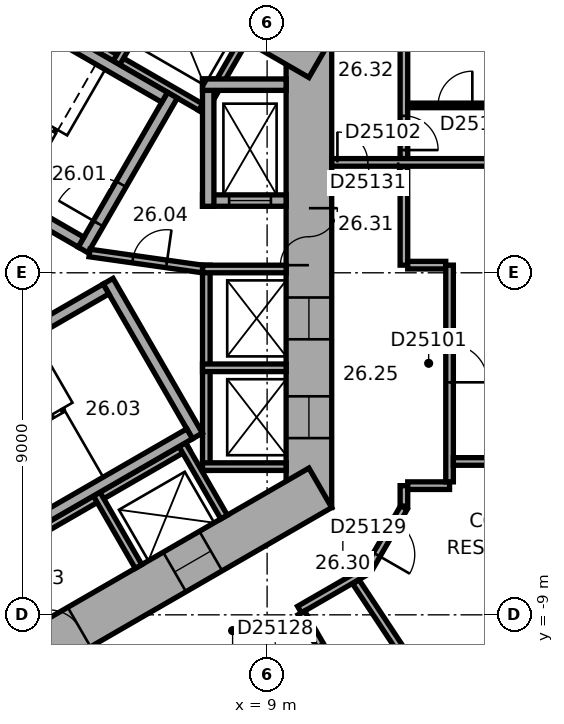
"""IFC4 building model, lengths in metres.
Left out: names, types, materials, properties, quantities, classifications, styles, units other than length and angle.
Written with IfcOpenShell. Run it as: python <this file> out.ifc"""

import sys

from ifc_helpers import new_model, si_unit, direction, frame, frame_2d, origin, place, context, subcontext, project, spatial, rectangle, extrude, element, fill, save


model = new_model("IFC4")
c1 = context("Model", 3, precision=1e-05, world=origin(), true_north=direction((0.0, 1.0)))
c2 = subcontext(c1, "Body", "Model", "MODEL_VIEW")
j1 = project(units=[si_unit("LENGTHUNIT", "METRE"), si_unit("PLANEANGLEUNIT", "RADIAN")], contexts=[c1])
p1 = place(None, origin())
s1 = spatial("IfcSite", under=j1, at=p1, CompositionType="ELEMENT")
p2 = place(p1, origin())
s2 = spatial("IfcBuilding", under=s1, at=p2, CompositionType="ELEMENT")
p3 = place(p2, frame((0.0, 0.0, 110.0)))
s3 = spatial("IfcBuildingStorey", under=s2, at=p3, CompositionType="ELEMENT", Elevation=110.0)
p4 = place(p3, frame((10.1, -6.177, 0.0), z_axis=(0.0, 0.0, 1.0), x_axis=(0.0, 1.0, 0.0)))
e1 = element("IfcWall", 1, at=p4, inside=s3, PredefinedType="SHEAR", context=c2, shape_type="SweptSolid", body=[
    extrude(rectangle(XDim=12.355, YDim=1.2, at=frame_2d((6.177, 0.0))), origin(), (0.0, 0.0, 1.0), 3.3),
])
p5 = place(p4, frame((6.378, 0.0, 0.0)))
e2 = element("IfcOpeningElement", 2, at=p5, cuts=e1, PredefinedType="OPENING", context=c2, shape_type="SweptSolid", body=[
    extrude(rectangle(XDim=1.5, YDim=2.1, at=frame_2d((0.75, 1.05))), frame((0.0, 0.61, 0.0), z_axis=(0.0, -1.0, 0.0), x_axis=(1.0, 0.0, 0.0)), (0.0, 0.0, 1.0), 1.22),
])
p6 = place(p4, frame((1.828, 0.0, 0.0)))
e3 = element("IfcOpeningElement", 3, at=p6, cuts=e1, PredefinedType="OPENING", context=c2, shape_type="SweptSolid", body=[
    extrude(rectangle(XDim=1.1, YDim=2.1, at=frame_2d((0.55, 1.05))), frame((0.0, 0.61, 0.0), z_axis=(0.0, -1.0, 0.0), x_axis=(1.0, 0.0, 0.0)), (0.0, 0.0, 1.0), 1.22),
])
p7 = place(p4, frame((4.427, 0.0, 0.0)))
e4 = element("IfcOpeningElement", 4, at=p7, cuts=e1, PredefinedType="OPENING", context=c2, shape_type="SweptSolid", body=[
    extrude(rectangle(XDim=1.1, YDim=2.1, at=frame_2d((0.55, 1.05))), frame((0.0, 0.61, 0.0), z_axis=(0.0, -1.0, 0.0), x_axis=(1.0, 0.0, 0.0)), (0.0, 0.0, 1.0), 1.22),
])
p8 = place(p3, frame((10.4, 5.658, 0.0), z_axis=(0.0, 0.0, 1.0), x_axis=(-0.866021384402, 0.500006961711, 0.0)))
e5 = element("IfcWall", 5, at=p8, inside=s3, PredefinedType="SHEAR", context=c2, shape_type="SweptSolid", body=[
    extrude(rectangle(XDim=12.355, YDim=1.2, at=frame_2d((6.178, 0.0))), origin(), (0.0, 0.0, 1.0), 3.3),
])
p9 = place(p8, frame((2.728, 0.0, 0.0)))
e6 = element("IfcOpeningElement", 6, at=p9, cuts=e5, PredefinedType="OPENING", context=c2, shape_type="SweptSolid", body=[
    extrude(rectangle(XDim=1.1, YDim=2.1, at=frame_2d((0.55, 1.05))), frame((0.0, 0.61, 0.0), z_axis=(0.0, -1.0, 0.0), x_axis=(1.0, 0.0, 0.0)), (0.0, 0.0, 1.0), 1.22),
])
p10 = place(p8, frame((5.328, 0.0, 0.0)))
e7 = element("IfcOpeningElement", 7, at=p10, cuts=e5, PredefinedType="OPENING", context=c2, shape_type="SweptSolid", body=[
    extrude(rectangle(XDim=1.1, YDim=2.1, at=frame_2d((0.55, 1.05))), frame((0.0, 0.61, 0.0), z_axis=(0.0, -1.0, 0.0), x_axis=(1.0, 0.0, 0.0)), (0.0, 0.0, 1.0), 1.22),
])
p11 = place(p8, frame((7.928, 0.0, 0.0)))
e8 = element("IfcOpeningElement", 8, at=p11, cuts=e5, PredefinedType="OPENING", context=c2, shape_type="SweptSolid", body=[
    extrude(rectangle(XDim=1.1, YDim=2.1, at=frame_2d((0.55, 1.05))), frame((0.0, 0.61, 0.0), z_axis=(0.0, -1.0, 0.0), x_axis=(1.0, 0.0, 0.0)), (0.0, 0.0, 1.0), 1.22),
])
p12 = place(p3, frame((-0.3, -11.836, 0.0), z_axis=(0.0, 0.0, 1.0), x_axis=(0.866021384402, 0.500006961711, 0.0)))
e9 = element("IfcWall", 9, at=p12, inside=s3, PredefinedType="SHEAR", context=c2, shape_type="SweptSolid", body=[
    extrude(rectangle(XDim=12.355, YDim=1.2, at=frame_2d((6.178, 0.0))), origin(), (0.0, 0.0, 1.0), 3.3),
])
p13 = place(p12, frame((4.128, 0.0, 0.0)))
e10 = element("IfcOpeningElement", 10, at=p13, cuts=e9, PredefinedType="OPENING", context=c2, shape_type="SweptSolid", body=[
    extrude(rectangle(XDim=0.9, YDim=2.1, at=frame_2d((0.45, 1.05))), frame((0.0, 0.61, 0.0), z_axis=(0.0, -1.0, 0.0), x_axis=(1.0, 0.0, 0.0)), (0.0, 0.0, 1.0), 1.22),
])
p14 = place(p12, frame((7.928, 0.0, 0.0)))
e11 = element("IfcOpeningElement", 11, at=p14, cuts=e9, PredefinedType="OPENING", context=c2, shape_type="SweptSolid", body=[
    extrude(rectangle(XDim=1.1, YDim=2.1, at=frame_2d((0.55, 1.05))), frame((0.0, 0.61, 0.0), z_axis=(0.0, -1.0, 0.0), x_axis=(1.0, 0.0, 0.0)), (0.0, 0.0, 1.0), 1.22),
])
p15 = place(p3, frame((7.4, -5.2, 0.0), z_axis=(0.0, 0.0, 1.0), x_axis=(0.0, 1.0, 0.0)))
e12 = element("IfcWall", 12, at=p15, inside=s3, PredefinedType="PARTITIONING", context=c2, shape_type="SweptSolid", body=[
    extrude(rectangle(XDim=5.4, YDim=0.2, at=frame_2d((2.7, 0.0))), origin(), (0.0, 0.0, 1.0), 3.05),
])
for number, where, z_axis, x_axis in (
    (13, (7.3, -5.1, 0.0), (0.0, 0.0, 1.0), (1.0, 0.0, 0.0)),
    (14, (7.3, -2.5, 0.0), (0.0, 0.0, 1.0), (1.0, 0.0, 0.0)),
    (15, (7.3, 0.1, 0.0), (0.0, 0.0, 1.0), (1.0, 0.0, 0.0)),
):
    element("IfcWall", number, at=place(p3, frame(where, z_axis=z_axis, x_axis=x_axis)), inside=s3, PredefinedType="PARTITIONING", context=c2, shape_type="SweptSolid", body=[
        extrude(rectangle(XDim=2.2, YDim=0.2, at=frame_2d((1.1, 0.0))), origin(), (0.0, 0.0, 1.0), 3.05),
    ])
p16 = place(p3, frame((7.424, 4.259, 0.0), z_axis=(0.0, 0.0, 1.0), x_axis=(-0.866026010844, 0.49999894854, 0.0)))
e16 = element("IfcWall", 16, at=p16, inside=s3, PredefinedType="PARTITIONING", context=c2, shape_type="SweptSolid", body=[
    extrude(rectangle(XDim=8.0, YDim=0.2, at=frame_2d((4.0, 0.0))), origin(), (0.0, 0.0, 1.0), 3.05),
])
for number, where, z_axis, x_axis in (
    (17, (7.287, 4.222, 0.0), (0.0, 0.0, 1.0), (0.5, 0.866, 0.0)),
    (18, (5.036, 5.522, 0.0), (0.0, 0.0, 1.0), (0.5, 0.866, 0.0)),
):
    element("IfcWall", number, at=place(p3, frame(where, z_axis=z_axis, x_axis=x_axis)), inside=s3, PredefinedType="PARTITIONING", context=c2, shape_type="SweptSolid", body=[
        extrude(rectangle(XDim=2.2, YDim=0.2, at=frame_2d((1.1, 0.0))), origin(), (0.0, 0.0, 1.0), 3.05),
    ])
p17 = place(p3, frame((-0.024, -8.559, 0.0), z_axis=(0.0, 0.0, 1.0), x_axis=(0.866026010844, 0.49999894854, 0.0)))
e19 = element("IfcWall", 19, at=p17, inside=s3, PredefinedType="PARTITIONING", context=c2, shape_type="SweptSolid", body=[
    extrude(rectangle(XDim=8.0, YDim=0.2, at=frame_2d((4.0, 0.0))), origin(), (0.0, 0.0, 1.0), 3.05),
])
for number, where, z_axis, x_axis in (
    (20, (4.516, -5.822, 0.0), (0.0, 0.0, 1.0), (0.5, -0.866, 0.0)),
    (21, (6.768, -4.522, 0.0), (0.0, 0.0, 1.0), (0.5, -0.866, 0.0)),
):
    element("IfcWall", number, at=place(p3, frame(where, z_axis=z_axis, x_axis=x_axis)), inside=s3, PredefinedType="PARTITIONING", context=c2, shape_type="SweptSolid", body=[
        extrude(rectangle(XDim=2.2, YDim=0.2, at=frame_2d((1.1, 0.0))), origin(), (0.0, 0.0, 1.0), 3.05),
    ])
p18 = place(p3, frame((4.158, 0.602, 0.0), z_axis=(0.0, 0.0, 1.0), x_axis=(0.499977259774, 0.866038532462, 0.0)))
e22 = element("IfcWall", 22, at=p18, inside=s3, PredefinedType="SHEAR", context=c2, shape_type="SweptSolid", body=[
    extrude(rectangle(XDim=4.7, YDim=0.3, at=frame_2d((2.35, 0.0))), origin(), (0.0, 0.0, 1.0), 3.05),
])
p19 = place(p18, frame((0.8, 0.0, 0.0)))
e23 = element("IfcOpeningElement", 23, at=p19, cuts=e22, PredefinedType="OPENING", context=c2, shape_type="SweptSolid", body=[
    extrude(rectangle(XDim=1.2, YDim=2.1, at=frame_2d((0.6, 1.05))), frame((0.0, 0.16, 0.0), z_axis=(0.0, -1.0, 0.0), x_axis=(1.0, 0.0, 0.0)), (0.0, 0.0, 1.0), 0.32),
])
for number, where, z_axis, x_axis in (
    (24, (4.103, 0.807, 0.0), (0.0, 0.0, 1.0), (-0.866, 0.5, 0.0)),
    (25, (6.303, 4.617, 0.0), (0.0, 0.0, 1.0), (-0.866, 0.5, 0.0)),
):
    element("IfcWall", number, at=place(p3, frame(where, z_axis=z_axis, x_axis=x_axis)), inside=s3, PredefinedType="SHEAR", context=c2, shape_type="SweptSolid", body=[
        extrude(rectangle(XDim=7.06, YDim=0.3, at=frame_2d((3.53, 0.0))), origin(), (0.0, 0.0, 1.0), 3.05),
    ])
p20 = place(p3, frame((4.816, -0.222, 0.0), z_axis=(0.0, 0.0, 1.0), x_axis=(0.499977259774, -0.866038532462, 0.0)))
e26 = element("IfcWall", 26, at=p20, inside=s3, PredefinedType="SHEAR", context=c2, shape_type="SweptSolid", body=[
    extrude(rectangle(XDim=4.7, YDim=0.3, at=frame_2d((2.35, 0.0))), origin(), (0.0, 0.0, 1.0), 3.05),
])
for number, where, z_axis, x_axis in (
    (27, (-1.353, -3.957, 0.0), (0.0, 0.0, 1.0), (0.866, 0.5, 0.0)),
    (28, (0.847, -7.767, 0.0), (0.0, 0.0, 1.0), (0.866, 0.5, 0.0)),
):
    element("IfcWall", number, at=place(p3, frame(where, z_axis=z_axis, x_axis=x_axis)), inside=s3, PredefinedType="SHEAR", context=c2, shape_type="SweptSolid", body=[
        extrude(rectangle(XDim=7.06, YDim=0.3, at=frame_2d((3.53, 0.0))), origin(), (0.0, 0.0, 1.0), 3.05),
    ])
p21 = place(p3, frame((7.3, 1.9, 0.0), z_axis=(0.0, 0.0, 1.0), x_axis=(1.0, 0.0, 0.0)))
e29 = element("IfcWall", 29, at=p21, inside=s3, PredefinedType="SHEAR", context=c2, shape_type="SweptSolid", body=[
    extrude(rectangle(XDim=2.2, YDim=0.3, at=frame_2d((1.1, 0.0))), origin(), (0.0, 0.0, 1.0), 3.05),
])
p22 = place(p21, frame((0.7, 0.0, 0.0)))
e30 = element("IfcOpeningElement", 30, at=p22, cuts=e29, PredefinedType="OPENING", context=c2, shape_type="SweptSolid", body=[
    extrude(rectangle(XDim=1.1, YDim=2.1, at=frame_2d((0.55, 1.05))), frame((0.0, 0.16, 0.0), z_axis=(0.0, -1.0, 0.0), x_axis=(1.0, 0.0, 0.0)), (0.0, 0.0, 1.0), 0.32),
])
p23 = place(p3, frame((7.45, 1.75, 0.0), z_axis=(0.0, 0.0, 1.0), x_axis=(0.0, 1.0, 0.0)))
e31 = element("IfcWall", 31, at=p23, inside=s3, PredefinedType="SHEAR", context=c2, shape_type="SweptSolid", body=[
    extrude(rectangle(XDim=3.35, YDim=0.3, at=frame_2d((1.675, 0.0))), origin(), (0.0, 0.0, 1.0), 3.05),
])
p24 = place(p3, frame((7.3, 4.95, 0.0), z_axis=(0.0, 0.0, 1.0), x_axis=(1.0, 0.0, 0.0)))
e32 = element("IfcWall", 32, at=p24, inside=s3, PredefinedType="SHEAR", context=c2, shape_type="SweptSolid", body=[
    extrude(rectangle(XDim=2.2, YDim=0.3, at=frame_2d((1.1, 0.0))), origin(), (0.0, 0.0, 1.0), 3.05),
])
p25 = place(p3, frame((4.327, 0.521, 0.0), z_axis=(0.0, 0.0, 1.0), x_axis=(0.990124376366, -0.14019172346, 0.0)))
e33 = element("IfcWall", 33, at=p25, inside=s3, PredefinedType="PARTITIONING", context=c2, shape_type="SweptSolid", body=[
    extrude(rectangle(XDim=3.002, YDim=0.2, at=frame_2d((1.501, 0.0))), origin(), (0.0, 0.0, 1.0), 3.05),
])
p26 = place(p25, frame((1.15, 0.0, 0.0)))
e34 = element("IfcOpeningElement", 34, at=p26, cuts=e33, PredefinedType="OPENING", context=c2, shape_type="SweptSolid", body=[
    extrude(rectangle(XDim=0.9, YDim=2.1, at=frame_2d((0.45, 1.05))), frame((0.0, 0.11, 0.0), z_axis=(0.0, -1.0, 0.0), x_axis=(1.0, 0.0, 0.0)), (0.0, 0.0, 1.0), 0.22),
])
p27 = place(p3, frame((9.852, -8.861, 0.0), z_axis=(0.0, 0.0, 1.0), x_axis=(0.866013291437, 0.500020978615, 0.0)))
e35 = element("IfcWall", 35, at=p27, inside=s3, PredefinedType="PARTITIONING", context=c2, shape_type="SweptSolid", body=[
    extrude(rectangle(XDim=2.077, YDim=0.2, at=frame_2d((1.038, 0.0))), origin(), (0.0, 0.0, 1.0), 3.05),
])
p28 = place(p3, frame((10.402, -9.815, 0.0), z_axis=(0.0, 0.0, 1.0), x_axis=(-0.499968756647, 0.866043441391, 0.0)))
e36 = element("IfcWall", 36, at=p28, inside=s3, PredefinedType="PARTITIONING", context=c2, shape_type="SweptSolid", body=[
    extrude(rectangle(XDim=1.001, YDim=0.2, at=frame_2d((0.5, 0.0))), origin(), (0.0, 0.0, 1.0), 3.05),
])
p29 = place(p3, frame((11.67, -7.788, 0.0), z_axis=(0.0, 0.0, 1.0), x_axis=(0.500063286585, 0.865988862174, 0.0)))
e37 = element("IfcWall", 37, at=p29, inside=s3, PredefinedType="PARTITIONING", context=c2, shape_type="SweptSolid", body=[
    extrude(rectangle(XDim=1.86, YDim=0.2, at=frame_2d((0.93, 0.0))), origin(), (0.0, 0.0, 1.0), 3.05),
])
p30 = place(p29, frame((0.43, 0.0, 0.0)))
e38 = element("IfcOpeningElement", 38, at=p30, cuts=e37, PredefinedType="OPENING", context=c2, shape_type="SweptSolid", body=[
    extrude(rectangle(XDim=1.0, YDim=2.1, at=frame_2d((0.5, 1.05))), frame((0.0, 0.11, 0.0), z_axis=(0.0, -1.0, 0.0), x_axis=(1.0, 0.0, 0.0)), (0.0, 0.0, 1.0), 0.22),
])
p31 = place(p3, frame((12.6, -6.138, 0.0), z_axis=(0.0, 0.0, 1.0), x_axis=(0.0, 1.0, 0.0)))
e39 = element("IfcWall", 39, at=p31, inside=s3, PredefinedType="PARTITIONING", context=c2, shape_type="SweptSolid", body=[
    extrude(rectangle(XDim=0.537, YDim=0.2, at=frame_2d((0.268, 0.0))), origin(), (0.0, 0.0, 1.0), 3.05),
])
p32 = place(p3, frame((12.6, 0.201, 0.0), z_axis=(0.0, 0.0, 1.0), x_axis=(0.0, 1.0, 0.0)))
e40 = element("IfcWall", 40, at=p32, inside=s3, PredefinedType="PARTITIONING", context=c2, shape_type="SweptSolid", body=[
    extrude(rectangle(XDim=2.604, YDim=0.2, at=frame_2d((1.302, 0.0))), origin(), (0.0, 0.0, 1.0), 3.05),
])
p33 = place(p3, frame((12.6, 3.004, 0.0), z_axis=(0.0, 0.0, 1.0), x_axis=(0.0, 1.0, 0.0)))
e41 = element("IfcWall", 41, at=p33, inside=s3, PredefinedType="PARTITIONING", context=c2, shape_type="SweptSolid", body=[
    extrude(rectangle(XDim=3.173, YDim=0.2, at=frame_2d((1.586, 0.0))), origin(), (0.0, 0.0, 1.0), 3.05),
])
p34 = place(p33, frame((0.225, 0.0, 0.0)))
e42 = element("IfcOpeningElement", 42, at=p34, cuts=e41, PredefinedType="OPENING", context=c2, shape_type="SweptSolid", body=[
    extrude(rectangle(XDim=0.9, YDim=2.1, at=frame_2d((0.45, 1.05))), frame((0.0, 0.11, 0.0), z_axis=(0.0, -1.0, 0.0), x_axis=(1.0, 0.0, 0.0)), (0.0, 0.0, 1.0), 0.22),
])
p35 = place(p3, frame((12.7, -5.601, 0.0), z_axis=(0.0, 0.0, 1.0), x_axis=(1.0, 0.0, 0.0)))
e43 = element("IfcWall", 43, at=p35, inside=s3, PredefinedType="PARTITIONING", context=c2, shape_type="SweptSolid", body=[
    extrude(rectangle(XDim=1.101, YDim=0.2, at=frame_2d((0.551, 0.0))), origin(), (0.0, 0.0, 1.0), 3.05),
])
p36 = place(p3, frame((13.701, 0.201, 0.0), z_axis=(0.0, 0.0, 1.0), x_axis=(-1.0, 0.0, 0.0)))
e44 = element("IfcWall", 44, at=p36, inside=s3, PredefinedType="PARTITIONING", context=c2, shape_type="SweptSolid", body=[
    extrude(rectangle(XDim=1.001, YDim=0.2, at=frame_2d((0.5, 0.0))), origin(), (0.0, 0.0, 1.0), 3.05),
])
p37 = place(p3, frame((13.801, -5.501, 0.0), z_axis=(0.0, 0.0, 1.0), x_axis=(0.0, 1.0, 0.0)))
e45 = element("IfcWall", 45, at=p37, inside=s3, PredefinedType="PARTITIONING", context=c2, shape_type="SweptSolid", body=[
    extrude(rectangle(XDim=5.702, YDim=0.2, at=frame_2d((2.851, 0.0))), origin(), (0.0, 0.0, 1.0), 3.05),
])
p38 = place(p37, frame((2.619, 0.0, 0.0)))
e46 = element("IfcOpeningElement", 46, at=p38, cuts=e45, PredefinedType="OPENING", context=c2, shape_type="SweptSolid", body=[
    extrude(rectangle(XDim=1.0, YDim=2.1, at=frame_2d((0.5, 1.05))), frame((0.0, 0.11, 0.0), z_axis=(0.0, -1.0, 0.0), x_axis=(1.0, 0.0, 0.0)), (0.0, 0.0, 1.0), 0.22),
])
p39 = place(p3, frame((13.901, -4.965, 0.0), z_axis=(0.0, 0.0, 1.0), x_axis=(1.0, 0.0, 0.0)))
e47 = element("IfcWall", 47, at=p39, inside=s3, PredefinedType="PARTITIONING", context=c2, shape_type="SweptSolid", body=[
    extrude(rectangle(XDim=8.049, YDim=0.2, at=frame_2d((4.024, 0.0))), origin(), (0.0, 0.0, 1.0), 3.05),
])
p40 = place(p3, frame((15.2, 4.405, 0.0), z_axis=(0.0, 0.0, 1.0), x_axis=(-1.0, 0.0, 0.0)))
e48 = element("IfcWall", 48, at=p40, inside=s3, PredefinedType="PARTITIONING", context=c2, shape_type="SweptSolid", body=[
    extrude(rectangle(XDim=2.5, YDim=0.12, at=frame_2d((1.25, 0.0))), origin(), (0.0, 0.0, 1.0), 3.05),
])
p41 = place(p40, frame((0.8, 0.0, 0.0)))
e49 = element("IfcOpeningElement", 49, at=p41, cuts=e48, PredefinedType="OPENING", context=c2, shape_type="SweptSolid", body=[
    extrude(rectangle(XDim=0.9, YDim=2.1, at=frame_2d((0.45, 1.05))), frame((0.0, 0.07, 0.0), z_axis=(0.0, -1.0, 0.0), x_axis=(1.0, 0.0, 0.0)), (0.0, 0.0, 1.0), 0.14),
])
p42 = place(p3, frame((16.255, -15.564, 0.0), z_axis=(0.0, 0.0, 1.0), x_axis=(-0.55192208744, 0.833895682562, 0.0)))
e50 = element("IfcWall", 50, at=p42, inside=s3, PredefinedType="PARTITIONING", context=c2, shape_type="SweptSolid", body=[
    extrude(rectangle(XDim=8.913, YDim=0.2, at=frame_2d((4.457, 0.0))), origin(), (0.0, 0.0, 1.0), 2.6),
])
p43 = place(p3, frame((21.95, 2.905, 0.0), z_axis=(0.0, 0.0, 1.0), x_axis=(-1.0, 0.0, 0.0)))
e51 = element("IfcWall", 51, at=p43, inside=s3, PredefinedType="PARTITIONING", context=c2, shape_type="SweptSolid", body=[
    extrude(rectangle(XDim=11.25, YDim=0.2, at=frame_2d((5.625, 0.0))), origin(), (0.0, 0.0, 1.0), 3.05),
])
p44 = place(p43, frame((9.5, 0.0, 0.0)))
e52 = element("IfcOpeningElement", 52, at=p44, cuts=e51, PredefinedType="OPENING", context=c2, shape_type="SweptSolid", body=[
    extrude(rectangle(XDim=1.6, YDim=2.1, at=frame_2d((0.8, 1.05))), frame((0.0, 0.11, 0.0), z_axis=(0.0, -1.0, 0.0), x_axis=(1.0, 0.0, 0.0)), (0.0, 0.0, 1.0), 0.22),
])
p45 = place(p5, origin())
e53 = element("IfcDoor", 53, at=p45, inside=s3, OperationType="DOUBLE_DOOR_SINGLE_SWING", PredefinedType="DOOR", context=c2, shape_type="SweptSolid", body=[
    extrude(rectangle(XDim=1.5, YDim=2.1, at=frame_2d((0.75, 1.05))), frame((0.0, 0.025, 0.0), z_axis=(0.0, -1.0, 0.0), x_axis=(1.0, 0.0, 0.0)), (0.0, 0.0, 1.0), 0.05),
])
fill(e2, e53)
p46 = place(p19, origin())
e54 = element("IfcDoor", 54, at=p46, inside=s3, OperationType="SINGLE_SWING_RIGHT", PredefinedType="DOOR", context=c2, shape_type="SweptSolid", body=[
    extrude(rectangle(XDim=1.2, YDim=2.1, at=frame_2d((0.6, 1.05))), frame((0.0, 0.025, 0.0), z_axis=(0.0, -1.0, 0.0), x_axis=(1.0, 0.0, 0.0)), (0.0, 0.0, 1.0), 0.05),
])
fill(e23, e54)
p47 = place(p26, origin())
e55 = element("IfcDoor", 55, at=p47, inside=s3, OperationType="SINGLE_SWING_LEFT", PredefinedType="DOOR", context=c2, shape_type="SweptSolid", body=[
    extrude(rectangle(XDim=0.9, YDim=2.1, at=frame_2d((0.45, 1.05))), frame((0.0, 0.025, 0.0), z_axis=(0.0, -1.0, 0.0), x_axis=(1.0, 0.0, 0.0)), (0.0, 0.0, 1.0), 0.05),
])
fill(e34, e55)
p48 = place(p13, origin())
e56 = element("IfcDoor", 56, at=p48, inside=s3, OperationType="SINGLE_SWING_LEFT", PredefinedType="DOOR", context=c2, shape_type="SweptSolid", body=[
    extrude(rectangle(XDim=0.9, YDim=2.1, at=frame_2d((0.45, 1.05))), frame((0.0, 0.025, 0.0), z_axis=(0.0, -1.0, 0.0), x_axis=(1.0, 0.0, 0.0)), (0.0, 0.0, 1.0), 0.05),
])
fill(e10, e56)
p49 = place(p22, origin())
e57 = element("IfcDoor", 57, at=p49, inside=s3, OperationType="DOUBLE_DOOR_SLIDING", PredefinedType="DOOR", context=c2, shape_type="SweptSolid", body=[
    extrude(rectangle(XDim=1.1, YDim=2.1, at=frame_2d((0.55, 1.05))), frame((0.0, 0.025, 0.0), z_axis=(0.0, -1.0, 0.0), x_axis=(1.0, 0.0, 0.0)), (0.0, 0.0, 1.0), 0.05),
])
fill(e30, e57)
p50 = place(p6, origin())
e58 = element("IfcDoor", 58, at=p50, inside=s3, OperationType="DOUBLE_DOOR_SLIDING", PredefinedType="DOOR", context=c2, shape_type="SweptSolid", body=[
    extrude(rectangle(XDim=1.1, YDim=2.1, at=frame_2d((0.55, 1.05))), frame((0.0, 0.025, 0.0), z_axis=(0.0, -1.0, 0.0), x_axis=(1.0, 0.0, 0.0)), (0.0, 0.0, 1.0), 0.05),
])
fill(e3, e58)
p51 = place(p7, origin())
e59 = element("IfcDoor", 59, at=p51, inside=s3, OperationType="DOUBLE_DOOR_SLIDING", PredefinedType="DOOR", context=c2, shape_type="SweptSolid", body=[
    extrude(rectangle(XDim=1.1, YDim=2.1, at=frame_2d((0.55, 1.05))), frame((0.0, 0.025, 0.0), z_axis=(0.0, -1.0, 0.0), x_axis=(1.0, 0.0, 0.0)), (0.0, 0.0, 1.0), 0.05),
])
fill(e4, e59)
p52 = place(p14, origin())
e60 = element("IfcDoor", 60, at=p52, inside=s3, OperationType="DOUBLE_DOOR_SLIDING", PredefinedType="DOOR", context=c2, shape_type="SweptSolid", body=[
    extrude(rectangle(XDim=1.1, YDim=2.1, at=frame_2d((0.55, 1.05))), frame((0.0, 0.025, 0.0), z_axis=(0.0, -1.0, 0.0), x_axis=(1.0, 0.0, 0.0)), (0.0, 0.0, 1.0), 0.05),
])
fill(e11, e60)
p53 = place(p38, origin())
e61 = element("IfcDoor", 61, at=p53, inside=s3, OperationType="SINGLE_SWING_LEFT", PredefinedType="DOOR", context=c2, shape_type="SweptSolid", body=[
    extrude(rectangle(XDim=1.0, YDim=2.1, at=frame_2d((0.5, 1.05))), frame((0.0, 0.025, 0.0), z_axis=(0.0, -1.0, 0.0), x_axis=(1.0, 0.0, 0.0)), (0.0, 0.0, 1.0), 0.05),
])
fill(e46, e61)
p54 = place(p34, origin())
e62 = element("IfcDoor", 62, at=p54, inside=s3, OperationType="SINGLE_SWING_LEFT", PredefinedType="DOOR", context=c2, shape_type="SweptSolid", body=[
    extrude(rectangle(XDim=0.9, YDim=2.1, at=frame_2d((0.45, 1.05))), frame((0.0, 0.025, 0.0), z_axis=(0.0, -1.0, 0.0), x_axis=(1.0, 0.0, 0.0)), (0.0, 0.0, 1.0), 0.05),
])
fill(e42, e62)
p55 = place(p41, origin())
e63 = element("IfcDoor", 63, at=p55, inside=s3, OperationType="SINGLE_SWING_LEFT", PredefinedType="DOOR", context=c2, shape_type="SweptSolid", body=[
    extrude(rectangle(XDim=0.9, YDim=2.1, at=frame_2d((0.45, 1.05))), frame((0.0, 0.025, 0.0), z_axis=(0.0, -1.0, 0.0), x_axis=(1.0, 0.0, 0.0)), (0.0, 0.0, 1.0), 0.05),
])
fill(e49, e63)
p56 = place(p30, origin())
e64 = element("IfcDoor", 64, at=p56, inside=s3, OperationType="SINGLE_SWING_LEFT", PredefinedType="DOOR", context=c2, shape_type="SweptSolid", body=[
    extrude(rectangle(XDim=1.0, YDim=2.1, at=frame_2d((0.5, 1.05))), frame((0.0, 0.025, 0.0), z_axis=(0.0, -1.0, 0.0), x_axis=(1.0, 0.0, 0.0)), (0.0, 0.0, 1.0), 0.05),
])
fill(e38, e64)
p57 = place(p44, origin())
e65 = element("IfcDoor", 65, at=p57, inside=s3, OperationType="DOUBLE_DOOR_SINGLE_SWING", PredefinedType="DOOR", context=c2, shape_type="SweptSolid", body=[
    extrude(rectangle(XDim=1.6, YDim=2.1, at=frame_2d((0.8, 1.05))), frame((0.0, 0.025, 0.0), z_axis=(0.0, -1.0, 0.0), x_axis=(1.0, 0.0, 0.0)), (0.0, 0.0, 1.0), 0.05),
])
fill(e52, e65)
save(model, sys.argv[1])
